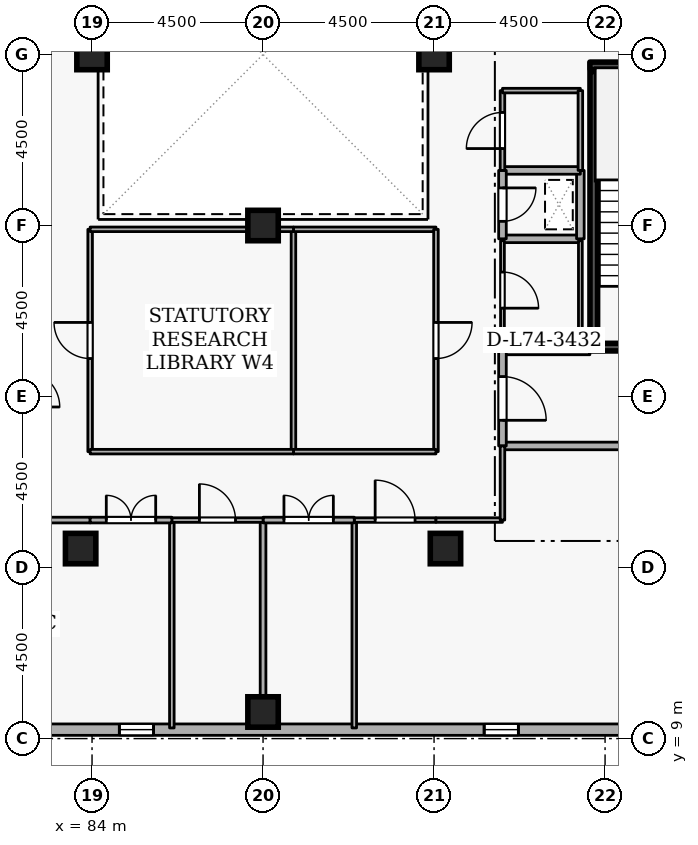
"""IFC4 building model, lengths in metres.
Left out: names, types, materials, properties, quantities, classifications, styles, units other than length and angle.
Written with IfcOpenShell. Run it as: python <this file> out.ifc"""

import sys

from ifc_helpers import new_model, si_unit, direction, frame, frame_2d, origin, origin_2d, place, context, subcontext, project, spatial, rectangle, extrude, element, fill, save


model = new_model("IFC4")
c1 = context("Model", 3, precision=1e-05, world=origin(), true_north=direction((0.0, 1.0)))
c2 = subcontext(c1, "Body", "Model", "MODEL_VIEW")
j1 = project(units=[si_unit("LENGTHUNIT", "METRE"), si_unit("PLANEANGLEUNIT", "RADIAN")], contexts=[c1])
p1 = place(None, origin())
s1 = spatial("IfcSite", under=j1, at=p1, CompositionType="ELEMENT")
p2 = place(p1, origin())
s2 = spatial("IfcBuilding", under=s1, at=p2, CompositionType="ELEMENT")
p3 = place(p2, frame((0.0, 0.0, 276.3)))
s3 = spatial("IfcBuildingStorey", under=s2, at=p3, CompositionType="ELEMENT", Elevation=276.3)
for number, where, z_axis, x_axis in (
    (1, (88.5, 9.7, 0.0), (0.0, 0.0, 1.0), (1.0, 0.0, 0.0)),
    (2, (93.3, 14.0, 0.0), (0.0, 0.0, 1.0), (1.0, 0.0, 0.0)),
    (3, (83.7, 14.0, 0.0), (0.0, 0.0, 1.0), (1.0, 0.0, 0.0)),
    (4, (93.0, 27.0, 0.0), (0.0, 0.0, 1.0), (1.0, 0.0, 0.0)),
    (5, (84.0, 27.0, 0.0), (0.0, 0.0, 1.0), (1.0, 0.0, 0.0)),
    (6, (88.5, 22.5, 0.0), (0.0, 0.0, 1.0), (1.0, 0.0, 0.0)),
):
    element("IfcColumn", number, at=place(p3, frame(where, z_axis=z_axis, x_axis=x_axis)), inside=s3, PredefinedType="COLUMN", context=c2, shape_type="SweptSolid", body=[
        extrude(rectangle(XDim=0.8, YDim=0.8, at=origin_2d()), origin(), (0.0, 0.0, 1.0), 3.6),
    ])
p4 = place(p3, frame((73.319, 9.235, 0.0), z_axis=(0.0, 0.0, 1.0), x_axis=(1.0, 0.0, 0.0)))
e7 = element("IfcWall", 7, at=p4, inside=s3, PredefinedType="STANDARD", context=c2, shape_type="SweptSolid", body=[
    extrude(rectangle(XDim=36.363, YDim=0.3, at=frame_2d((18.181, 0.0))), origin(), (0.0, 0.0, 1.0), 2.66),
])
p5 = place(p4, frame((6.6, 0.0, 0.72)))
e8 = element("IfcOpeningElement", 8, at=p5, cuts=e7, PredefinedType="OPENING", context=c2, shape_type="SweptSolid", body=[
    extrude(rectangle(XDim=0.9, YDim=1.75, at=frame_2d((0.45, 0.875))), frame((0.0, 0.16, 0.0), z_axis=(0.0, -1.0, 0.0), x_axis=(1.0, 0.0, 0.0)), (0.0, 0.0, 1.0), 0.32),
])
p6 = place(p4, frame((11.4, 0.0, 0.72)))
e9 = element("IfcOpeningElement", 9, at=p6, cuts=e7, PredefinedType="OPENING", context=c2, shape_type="SweptSolid", body=[
    extrude(rectangle(XDim=0.9, YDim=1.75, at=frame_2d((0.45, 0.875))), frame((0.0, 0.16, 0.0), z_axis=(0.0, -1.0, 0.0), x_axis=(1.0, 0.0, 0.0)), (0.0, 0.0, 1.0), 0.32),
])
p7 = place(p4, frame((21.0, 0.0, 0.72)))
e10 = element("IfcOpeningElement", 10, at=p7, cuts=e7, PredefinedType="OPENING", context=c2, shape_type="SweptSolid", body=[
    extrude(rectangle(XDim=0.9, YDim=1.75, at=frame_2d((0.45, 0.875))), frame((0.0, 0.16, 0.0), z_axis=(0.0, -1.0, 0.0), x_axis=(1.0, 0.0, 0.0)), (0.0, 0.0, 1.0), 0.32),
])
p8 = place(p4, frame((25.8, 0.0, 0.72)))
e11 = element("IfcOpeningElement", 11, at=p8, cuts=e7, PredefinedType="OPENING", context=c2, shape_type="SweptSolid", body=[
    extrude(rectangle(XDim=0.9, YDim=1.75, at=frame_2d((0.45, 0.875))), frame((0.0, 0.16, 0.0), z_axis=(0.0, -1.0, 0.0), x_axis=(1.0, 0.0, 0.0)), (0.0, 0.0, 1.0), 0.32),
])
p9 = place(p4, frame((30.6, 0.0, 0.72)))
e12 = element("IfcOpeningElement", 12, at=p9, cuts=e7, PredefinedType="OPENING", context=c2, shape_type="SweptSolid", body=[
    extrude(rectangle(XDim=0.9, YDim=1.75, at=frame_2d((0.45, 0.875))), frame((0.0, 0.16, 0.0), z_axis=(0.0, -1.0, 0.0), x_axis=(1.0, 0.0, 0.0)), (0.0, 0.0, 1.0), 0.32),
])
p10 = place(p3, frame((100.45, 19.3, 0.0), z_axis=(0.0, 0.0, 1.0), x_axis=(-1.0, 0.0, 0.0)))
e13 = element("IfcWall", 13, at=p10, inside=s3, PredefinedType="SHEAR", context=c2, shape_type="SweptSolid", body=[
    extrude(rectangle(XDim=3.35, YDim=0.2, at=frame_2d((1.675, 0.0))), origin(), (0.0, 0.0, 1.0), 3.6),
])
p11 = place(p10, frame((1.125, 0.0, 0.0)))
e14 = element("IfcOpeningElement", 14, at=p11, cuts=e13, PredefinedType="OPENING", context=c2, shape_type="SweptSolid", body=[
    extrude(rectangle(XDim=1.1, YDim=2.1, at=frame_2d((0.55, 1.05))), frame((0.0, 0.11, 0.0), z_axis=(0.0, -1.0, 0.0), x_axis=(1.0, 0.0, 0.0)), (0.0, 0.0, 1.0), 0.22),
])
p12 = place(p3, frame((97.1, 26.7, 0.0), z_axis=(0.0, 0.0, 1.0), x_axis=(1.0, 0.0, 0.0)))
e15 = element("IfcWall", 15, at=p12, inside=s3, PredefinedType="SHEAR", context=c2, shape_type="SweptSolid", body=[
    extrude(rectangle(XDim=3.35, YDim=0.2, at=frame_2d((1.675, 0.0))), origin(), (0.0, 0.0, 1.0), 3.6),
])
p13 = place(p3, frame((97.203, 26.55, 0.0), z_axis=(0.0, 0.0, 1.0), x_axis=(0.0, -1.0, 0.0)))
e16 = element("IfcWall", 16, at=p13, inside=s3, PredefinedType="SHEAR", context=c2, shape_type="SweptSolid", body=[
    extrude(rectangle(XDim=7.1, YDim=0.2, at=frame_2d((3.55, 0.0))), origin(), (0.0, 0.0, 1.0), 3.6),
])
p14 = place(p3, frame((94.8, 16.7, 0.0), z_axis=(0.0, 0.0, 1.0), x_axis=(1.0, 0.0, 0.0)))
e17 = element("IfcWall", 17, at=p14, inside=s3, PredefinedType="STANDARD", context=c2, shape_type="SweptSolid", body=[
    extrude(rectangle(XDim=5.7, YDim=0.2, at=frame_2d((2.85, 0.0))), origin(), (0.0, 0.0, 1.0), 3.26),
])
p15 = place(p3, frame((97.1, 19.2, 0.0), z_axis=(0.0, 0.0, 1.0), x_axis=(-1.0, 0.0, 0.0)))
e18 = element("IfcWall", 18, at=p15, inside=s3, PredefinedType="STANDARD", context=c2, shape_type="SweptSolid", body=[
    extrude(rectangle(XDim=2.3, YDim=0.2, at=frame_2d((1.15, 0.0))), origin(), (0.0, 0.0, 1.0), 2.465),
])
p16 = place(p3, frame((94.8, 19.2, 0.0), z_axis=(0.0, 0.0, 1.0), x_axis=(0.0, -1.0, 0.0)))
e19 = element("IfcWall", 19, at=p16, inside=s3, PredefinedType="STANDARD", context=c2, shape_type="SweptSolid", body=[
    extrude(rectangle(XDim=2.5, YDim=0.2, at=frame_2d((1.25, 0.0))), origin(), (0.0, 0.0, 1.0), 3.26),
])
p17 = place(p16, frame((0.675, 0.0, 0.0)))
e20 = element("IfcOpeningElement", 20, at=p17, cuts=e19, PredefinedType="OPENING", context=c2, shape_type="SweptSolid", body=[
    extrude(rectangle(XDim=1.15, YDim=2.1, at=frame_2d((0.575, 1.05))), frame((0.0, 0.11, 0.0), z_axis=(0.0, -1.0, 0.0), x_axis=(1.0, 0.0, 0.0)), (0.0, 0.0, 1.0), 0.22),
])
p18 = place(p3, frame((94.8, 22.15, 0.0), z_axis=(0.0, 0.0, 1.0), x_axis=(1.0, 0.0, 0.0)))
e21 = element("IfcWall", 21, at=p18, inside=s3, PredefinedType="STANDARD", context=c2, shape_type="SweptSolid", body=[
    extrude(rectangle(XDim=2.05, YDim=0.2, at=frame_2d((1.025, 0.0))), origin(), (0.0, 0.0, 1.0), 3.26),
])
p19 = place(p3, frame((96.85, 22.15, 0.0), z_axis=(0.0, 0.0, 1.0), x_axis=(0.0, 1.0, 0.0)))
e22 = element("IfcWall", 22, at=p19, inside=s3, PredefinedType="STANDARD", context=c2, shape_type="SweptSolid", body=[
    extrude(rectangle(XDim=1.8, YDim=0.2, at=frame_2d((0.9, 0.0))), origin(), (0.0, 0.0, 1.0), 3.26),
])
p20 = place(p3, frame((96.85, 23.95, 0.0), z_axis=(0.0, 0.0, 1.0), x_axis=(-1.0, 0.0, 0.0)))
e23 = element("IfcWall", 23, at=p20, inside=s3, PredefinedType="STANDARD", context=c2, shape_type="SweptSolid", body=[
    extrude(rectangle(XDim=2.05, YDim=0.2, at=frame_2d((1.025, 0.0))), origin(), (0.0, 0.0, 1.0), 3.26),
])
p21 = place(p3, frame((94.8, 23.95, 0.0), z_axis=(0.0, 0.0, 1.0), x_axis=(0.0, -1.0, 0.0)))
e24 = element("IfcWall", 24, at=p21, inside=s3, PredefinedType="STANDARD", context=c2, shape_type="SweptSolid", body=[
    extrude(rectangle(XDim=1.8, YDim=0.2, at=frame_2d((0.9, 0.0))), origin(), (0.0, 0.0, 1.0), 3.26),
])
p22 = place(p21, frame((0.46, 0.0, 0.0)))
e25 = element("IfcOpeningElement", 25, at=p22, cuts=e24, PredefinedType="OPENING", context=c2, shape_type="SweptSolid", body=[
    extrude(rectangle(XDim=0.88, YDim=2.04, at=frame_2d((0.44, 1.02))), frame((0.0, 0.11, 0.0), z_axis=(0.0, -1.0, 0.0), x_axis=(1.0, 0.0, 0.0)), (0.0, 0.0, 1.0), 0.22),
])
p23 = place(p3, frame((94.8, 19.5, 0.0), z_axis=(0.0, 0.0, 1.0), x_axis=(1.0, 0.0, 0.0)))
e26 = element("IfcWall", 26, at=p23, inside=s3, PredefinedType="PARTITIONING", context=c2, shape_type="SweptSolid", body=[
    extrude(rectangle(XDim=2.05, YDim=0.1, at=frame_2d((1.025, 0.0))), origin(), (0.0, 0.0, 1.0), 2.465),
])
p24 = place(p3, frame((96.85, 19.5, 0.0), z_axis=(0.0, 0.0, 1.0), x_axis=(0.0, 1.0, 0.0)))
e27 = element("IfcWall", 27, at=p24, inside=s3, PredefinedType="PARTITIONING", context=c2, shape_type="SweptSolid", body=[
    extrude(rectangle(XDim=2.6, YDim=0.1, at=frame_2d((1.3, 0.0))), origin(), (0.0, 0.0, 1.0), 3.26),
])
p25 = place(p3, frame((94.8, 22.1, 0.0), z_axis=(0.0, 0.0, 1.0), x_axis=(0.0, -1.0, 0.0)))
e28 = element("IfcWall", 28, at=p25, inside=s3, PredefinedType="PARTITIONING", context=c2, shape_type="SweptSolid", body=[
    extrude(rectangle(XDim=2.6, YDim=0.1, at=frame_2d((1.3, 0.0))), origin(), (0.0, 0.0, 1.0), 3.26),
])
p26 = place(p25, frame((0.825, 0.0, 0.0)))
e29 = element("IfcOpeningElement", 29, at=p26, cuts=e28, PredefinedType="OPENING", context=c2, shape_type="SweptSolid", body=[
    extrude(rectangle(XDim=0.95, YDim=2.1, at=frame_2d((0.475, 1.05))), frame((0.0, 0.06, 0.0), z_axis=(0.0, -1.0, 0.0), x_axis=(1.0, 0.0, 0.0)), (0.0, 0.0, 1.0), 0.12),
])
p27 = place(p3, frame((94.8, 23.95, 0.0), z_axis=(0.0, 0.0, 1.0), x_axis=(0.0, 1.0, 0.0)))
e30 = element("IfcWall", 30, at=p27, inside=s3, PredefinedType="PARTITIONING", context=c2, shape_type="SweptSolid", body=[
    extrude(rectangle(XDim=2.1, YDim=0.12, at=frame_2d((1.05, 0.0))), origin(), (0.0, 0.0, 1.0), 3.26),
])
p28 = place(p27, frame((0.575, 0.0, 0.0)))
e31 = element("IfcOpeningElement", 31, at=p28, cuts=e30, PredefinedType="OPENING", context=c2, shape_type="SweptSolid", body=[
    extrude(rectangle(XDim=0.95, YDim=2.1, at=frame_2d((0.475, 1.05))), frame((0.0, 0.07, 0.0), z_axis=(0.0, -1.0, 0.0), x_axis=(1.0, 0.0, 0.0)), (0.0, 0.0, 1.0), 0.14),
])
p29 = place(p3, frame((94.8, 26.05, 0.0), z_axis=(0.0, 0.0, 1.0), x_axis=(1.0, 0.0, 0.0)))
e32 = element("IfcWall", 32, at=p29, inside=s3, PredefinedType="PARTITIONING", context=c2, shape_type="SweptSolid", body=[
    extrude(rectangle(XDim=2.05, YDim=0.12, at=frame_2d((1.025, 0.0))), origin(), (0.0, 0.0, 1.0), 3.26),
])
p30 = place(p3, frame((96.85, 26.05, 0.0), z_axis=(0.0, 0.0, 1.0), x_axis=(0.0, -1.0, 0.0)))
e33 = element("IfcWall", 33, at=p30, inside=s3, PredefinedType="PARTITIONING", context=c2, shape_type="SweptSolid", body=[
    extrude(rectangle(XDim=2.1, YDim=0.12, at=frame_2d((1.05, 0.0))), origin(), (0.0, 0.0, 1.0), 3.26),
])
p31 = place(p3, frame((90.9, 9.28, 0.0), z_axis=(0.0, 0.0, 1.0), x_axis=(0.0, 1.0, 0.0)))
e34 = element("IfcWall", 34, at=p31, inside=s3, PredefinedType="PARTITIONING", context=c2, shape_type="SweptSolid", body=[
    extrude(rectangle(XDim=5.47, YDim=0.12, at=frame_2d((2.735, 0.0))), origin(), (0.0, 0.0, 1.0), 3.26),
])
p32 = place(p3, frame((90.9, 14.75, 0.0), z_axis=(0.0, 0.0, 1.0), x_axis=(1.0, 0.0, 0.0)))
e35 = element("IfcWall", 35, at=p32, inside=s3, PredefinedType="PARTITIONING", context=c2, shape_type="SweptSolid", body=[
    extrude(rectangle(XDim=2.15, YDim=0.12, at=frame_2d((1.075, 0.0))), origin(), (0.0, 0.0, 1.0), 3.26),
])
p33 = place(p32, frame((0.55, 0.0, 0.0)))
e36 = element("IfcOpeningElement", 36, at=p33, cuts=e35, PredefinedType="OPENING", context=c2, shape_type="SweptSolid", body=[
    extrude(rectangle(XDim=1.05, YDim=2.1, at=frame_2d((0.525, 1.05))), frame((0.0, 0.07, 0.0), z_axis=(0.0, -1.0, 0.0), x_axis=(1.0, 0.0, 0.0)), (0.0, 0.0, 1.0), 0.14),
])
p34 = place(p3, frame((93.05, 14.75, 0.0), z_axis=(0.0, 0.0, 1.0), x_axis=(1.0, 0.0, 0.0)))
e37 = element("IfcWall", 37, at=p34, inside=s3, PredefinedType="PARTITIONING", context=c2, shape_type="SweptSolid", body=[
    extrude(rectangle(XDim=1.75, YDim=0.12, at=frame_2d((0.875, 0.0))), origin(), (0.0, 0.0, 1.0), 3.26),
])
p35 = place(p3, frame((94.8, 14.75, 0.0), z_axis=(0.0, 0.0, 1.0), x_axis=(0.0, 1.0, 0.0)))
e38 = element("IfcWall", 38, at=p35, inside=s3, PredefinedType="PARTITIONING", context=c2, shape_type="SweptSolid", body=[
    extrude(rectangle(XDim=1.95, YDim=0.12, at=frame_2d((0.975, 0.0))), origin(), (0.0, 0.0, 1.0), 3.26),
])
p36 = place(p3, frame((88.5, 9.28, 0.0), z_axis=(0.0, 0.0, 1.0), x_axis=(0.0, 1.0, 0.0)))
e39 = element("IfcWall", 39, at=p36, inside=s3, PredefinedType="PARTITIONING", context=c2, shape_type="SweptSolid", body=[
    extrude(rectangle(XDim=5.47, YDim=0.15, at=frame_2d((2.735, 0.0))), origin(), (0.0, 0.0, 1.0), 2.802),
])
p37 = place(p3, frame((88.5, 14.75, 0.0), z_axis=(0.0, 0.0, 1.0), x_axis=(1.0, 0.0, 0.0)))
e40 = element("IfcWall", 40, at=p37, inside=s3, PredefinedType="PARTITIONING", context=c2, shape_type="SweptSolid", body=[
    extrude(rectangle(XDim=2.4, YDim=0.15, at=frame_2d((1.2, 0.0))), origin(), (0.0, 0.0, 1.0), 3.26),
])
p38 = place(p37, frame((0.55, 0.0, 0.0)))
e41 = element("IfcOpeningElement", 41, at=p38, cuts=e40, PredefinedType="OPENING", context=c2, shape_type="SweptSolid", body=[
    extrude(rectangle(XDim=1.3, YDim=2.12, at=frame_2d((0.65, 1.06))), frame((0.0, 0.085, 0.0), z_axis=(0.0, -1.0, 0.0), x_axis=(1.0, 0.0, 0.0)), (0.0, 0.0, 1.0), 0.17),
])
p39 = place(p3, frame((86.1, 9.28, 0.0), z_axis=(0.0, 0.0, 1.0), x_axis=(0.0, 1.0, 0.0)))
e42 = element("IfcWall", 42, at=p39, inside=s3, PredefinedType="PARTITIONING", context=c2, shape_type="SweptSolid", body=[
    extrude(rectangle(XDim=5.47, YDim=0.12, at=frame_2d((2.735, 0.0))), origin(), (0.0, 0.0, 1.0), 3.26),
])
p40 = place(p3, frame((86.1, 14.75, 0.0), z_axis=(0.0, 0.0, 1.0), x_axis=(1.0, 0.0, 0.0)))
e43 = element("IfcWall", 43, at=p40, inside=s3, PredefinedType="PARTITIONING", context=c2, shape_type="SweptSolid", body=[
    extrude(rectangle(XDim=2.4, YDim=0.12, at=frame_2d((1.2, 0.0))), origin(), (0.0, 0.0, 1.0), 3.26),
])
p41 = place(p40, frame((0.725, 0.0, 0.0)))
e44 = element("IfcOpeningElement", 44, at=p41, cuts=e43, PredefinedType="OPENING", context=c2, shape_type="SweptSolid", body=[
    extrude(rectangle(XDim=0.95, YDim=2.1, at=frame_2d((0.475, 1.05))), frame((0.0, 0.07, 0.0), z_axis=(0.0, -1.0, 0.0), x_axis=(1.0, 0.0, 0.0)), (0.0, 0.0, 1.0), 0.14),
])
p42 = place(p3, frame((82.2, 14.75, 0.0), z_axis=(0.0, 0.0, 1.0), x_axis=(1.0, 0.0, 0.0)))
e45 = element("IfcWall", 45, at=p42, inside=s3, PredefinedType="PARTITIONING", context=c2, shape_type="SweptSolid", body=[
    extrude(rectangle(XDim=1.75, YDim=0.15, at=frame_2d((0.875, 0.0))), origin(), (0.0, 0.0, 1.0), 3.26),
])
p43 = place(p3, frame((83.95, 14.75, 0.0), z_axis=(0.0, 0.0, 1.0), x_axis=(1.0, 0.0, 0.0)))
e46 = element("IfcWall", 46, at=p43, inside=s3, PredefinedType="PARTITIONING", context=c2, shape_type="SweptSolid", body=[
    extrude(rectangle(XDim=2.15, YDim=0.15, at=frame_2d((1.075, 0.0))), origin(), (0.0, 0.0, 1.0), 3.26),
])
p44 = place(p43, frame((0.425, 0.0, 0.0)))
e47 = element("IfcOpeningElement", 47, at=p44, cuts=e46, PredefinedType="OPENING", context=c2, shape_type="SweptSolid", body=[
    extrude(rectangle(XDim=1.3, YDim=2.12, at=frame_2d((0.65, 1.06))), frame((0.0, 0.085, 0.0), z_axis=(0.0, -1.0, 0.0), x_axis=(1.0, 0.0, 0.0)), (0.0, 0.0, 1.0), 0.17),
])
p45 = place(p3, frame((89.3, 16.55, 0.0), z_axis=(0.0, 0.0, 1.0), x_axis=(0.0, 1.0, 0.0)))
e48 = element("IfcWall", 48, at=p45, inside=s3, PredefinedType="PARTITIONING", context=c2, shape_type="SweptSolid", body=[
    extrude(rectangle(XDim=5.85, YDim=0.12, at=frame_2d((2.925, 0.0))), origin(), (0.0, 0.0, 1.0), 3.26),
])
p46 = place(p3, frame((89.3, 22.4, 0.0), z_axis=(0.0, 0.0, 1.0), x_axis=(1.0, 0.0, 0.0)))
e49 = element("IfcWall", 49, at=p46, inside=s3, PredefinedType="PARTITIONING", context=c2, shape_type="SweptSolid", body=[
    extrude(rectangle(XDim=3.75, YDim=0.12, at=frame_2d((1.875, 0.0))), origin(), (0.0, 0.0, 1.0), 3.26),
])
p47 = place(p3, frame((93.05, 22.4, 0.0), z_axis=(0.0, 0.0, 1.0), x_axis=(0.0, -1.0, 0.0)))
e50 = element("IfcWall", 50, at=p47, inside=s3, PredefinedType="PARTITIONING", context=c2, shape_type="SweptSolid", body=[
    extrude(rectangle(XDim=5.85, YDim=0.12, at=frame_2d((2.925, 0.0))), origin(), (0.0, 0.0, 1.0), 3.26),
])
p48 = place(p47, frame((2.45, 0.0, 0.0)))
e51 = element("IfcOpeningElement", 51, at=p48, cuts=e50, PredefinedType="OPENING", context=c2, shape_type="SweptSolid", body=[
    extrude(rectangle(XDim=0.95, YDim=2.1, at=frame_2d((0.475, 1.05))), frame((0.0, 0.07, 0.0), z_axis=(0.0, -1.0, 0.0), x_axis=(1.0, 0.0, 0.0)), (0.0, 0.0, 1.0), 0.14),
])
p49 = place(p3, frame((93.05, 16.55, 0.0), z_axis=(0.0, 0.0, 1.0), x_axis=(-1.0, 0.0, 0.0)))
e52 = element("IfcWall", 52, at=p49, inside=s3, PredefinedType="PARTITIONING", context=c2, shape_type="SweptSolid", body=[
    extrude(rectangle(XDim=3.75, YDim=0.12, at=frame_2d((1.875, 0.0))), origin(), (0.0, 0.0, 1.0), 3.26),
])
p50 = place(p3, frame((83.95, 16.55, 0.0), z_axis=(0.0, 0.0, 1.0), x_axis=(0.0, 1.0, 0.0)))
e53 = element("IfcWall", 53, at=p50, inside=s3, PredefinedType="PARTITIONING", context=c2, shape_type="SweptSolid", body=[
    extrude(rectangle(XDim=5.85, YDim=0.12, at=frame_2d((2.925, 0.0))), origin(), (0.0, 0.0, 1.0), 3.26),
])
p51 = place(p50, frame((2.45, 0.0, 0.0)))
e54 = element("IfcOpeningElement", 54, at=p51, cuts=e53, PredefinedType="OPENING", context=c2, shape_type="SweptSolid", body=[
    extrude(rectangle(XDim=0.95, YDim=2.1, at=frame_2d((0.475, 1.05))), frame((0.0, 0.07, 0.0), z_axis=(0.0, -1.0, 0.0), x_axis=(1.0, 0.0, 0.0)), (0.0, 0.0, 1.0), 0.14),
])
for number, where, z_axis, x_axis in (
    (55, (83.95, 22.4, 0.0), (0.0, 0.0, 1.0), (1.0, 0.0, 0.0)),
    (56, (89.3, 16.55, 0.0), (0.0, 0.0, 1.0), (-1.0, 0.0, 0.0)),
):
    element("IfcWall", number, at=place(p3, frame(where, z_axis=z_axis, x_axis=x_axis)), inside=s3, PredefinedType="PARTITIONING", context=c2, shape_type="SweptSolid", body=[
        extrude(rectangle(XDim=5.35, YDim=0.12, at=frame_2d((2.675, 0.0))), origin(), (0.0, 0.0, 1.0), 3.26),
    ])
p52 = place(p6, origin())
e57 = element("IfcWindow", 57, at=p52, inside=s3, PartitioningType="SINGLE_PANEL", PredefinedType="WINDOW", context=c2, shape_type="SweptSolid", body=[
    extrude(rectangle(XDim=0.9, YDim=1.75, at=frame_2d((0.45, 0.875))), frame((0.0, 0.03, 0.0), z_axis=(0.0, -1.0, 0.0), x_axis=(1.0, 0.0, 0.0)), (0.0, 0.0, 1.0), 0.06),
])
fill(e9, e57)
p53 = place(p7, origin())
e58 = element("IfcWindow", 58, at=p53, inside=s3, PartitioningType="SINGLE_PANEL", PredefinedType="WINDOW", context=c2, shape_type="SweptSolid", body=[
    extrude(rectangle(XDim=0.9, YDim=1.75, at=frame_2d((0.45, 0.875))), frame((0.0, 0.03, 0.0), z_axis=(0.0, -1.0, 0.0), x_axis=(1.0, 0.0, 0.0)), (0.0, 0.0, 1.0), 0.06),
])
fill(e10, e58)
p54 = place(p17, origin())
e59 = element("IfcDoor", 59, at=p54, inside=s3, OperationType="SINGLE_SWING_RIGHT", PredefinedType="DOOR", context=c2, shape_type="SweptSolid", body=[
    extrude(rectangle(XDim=1.15, YDim=2.1, at=frame_2d((0.575, 1.05))), frame((0.0, 0.025, 0.0), z_axis=(0.0, -1.0, 0.0), x_axis=(1.0, 0.0, 0.0)), (0.0, 0.0, 1.0), 0.05),
])
fill(e20, e59)
p55 = place(p22, origin())
e60 = element("IfcDoor", 60, at=p55, inside=s3, OperationType="SINGLE_SWING_LEFT", PredefinedType="DOOR", context=c2, shape_type="SweptSolid", body=[
    extrude(rectangle(XDim=0.88, YDim=2.04, at=frame_2d((0.44, 1.02))), frame((0.0, 0.025, 0.0), z_axis=(0.0, -1.0, 0.0), x_axis=(1.0, 0.0, 0.0)), (0.0, 0.0, 1.0), 0.05),
])
fill(e25, e60)
p56 = place(p26, origin())
e61 = element("IfcDoor", 61, at=p56, inside=s3, OperationType="SINGLE_SWING_RIGHT", PredefinedType="DOOR", context=c2, shape_type="SweptSolid", body=[
    extrude(rectangle(XDim=0.95, YDim=2.1, at=frame_2d((0.475, 1.05))), frame((0.0, 0.025, 0.0), z_axis=(0.0, -1.0, 0.0), x_axis=(1.0, 0.0, 0.0)), (0.0, 0.0, 1.0), 0.05),
])
fill(e29, e61)
p57 = place(p28, origin())
e62 = element("IfcDoor", 62, at=p57, inside=s3, OperationType="SINGLE_SWING_LEFT", PredefinedType="DOOR", context=c2, shape_type="SweptSolid", body=[
    extrude(rectangle(XDim=0.95, YDim=2.1, at=frame_2d((0.475, 1.05))), frame((0.0, 0.025, 0.0), z_axis=(0.0, -1.0, 0.0), x_axis=(1.0, 0.0, 0.0)), (0.0, 0.0, 1.0), 0.05),
])
fill(e31, e62)
p58 = place(p33, origin())
e63 = element("IfcDoor", 63, at=p58, inside=s3, OperationType="SINGLE_SWING_LEFT", PredefinedType="DOOR", context=c2, shape_type="SweptSolid", body=[
    extrude(rectangle(XDim=1.05, YDim=2.1, at=frame_2d((0.525, 1.05))), frame((0.0, 0.025, 0.0), z_axis=(0.0, -1.0, 0.0), x_axis=(1.0, 0.0, 0.0)), (0.0, 0.0, 1.0), 0.05),
])
fill(e36, e63)
p59 = place(p38, origin())
e64 = element("IfcDoor", 64, at=p59, inside=s3, OperationType="DOUBLE_DOOR_SINGLE_SWING", PredefinedType="DOOR", context=c2, shape_type="SweptSolid", body=[
    extrude(rectangle(XDim=1.3, YDim=2.12, at=frame_2d((0.65, 1.06))), frame((0.0, 0.025, 0.0), z_axis=(0.0, -1.0, 0.0), x_axis=(1.0, 0.0, 0.0)), (0.0, 0.0, 1.0), 0.05),
])
fill(e41, e64)
p60 = place(p41, origin())
e65 = element("IfcDoor", 65, at=p60, inside=s3, OperationType="SINGLE_SWING_LEFT", PredefinedType="DOOR", context=c2, shape_type="SweptSolid", body=[
    extrude(rectangle(XDim=0.95, YDim=2.1, at=frame_2d((0.475, 1.05))), frame((0.0, 0.025, 0.0), z_axis=(0.0, -1.0, 0.0), x_axis=(1.0, 0.0, 0.0)), (0.0, 0.0, 1.0), 0.05),
])
fill(e44, e65)
p61 = place(p44, origin())
e66 = element("IfcDoor", 66, at=p61, inside=s3, OperationType="DOUBLE_DOOR_SINGLE_SWING", PredefinedType="DOOR", context=c2, shape_type="SweptSolid", body=[
    extrude(rectangle(XDim=1.3, YDim=2.12, at=frame_2d((0.65, 1.06))), frame((0.0, 0.025, 0.0), z_axis=(0.0, -1.0, 0.0), x_axis=(1.0, 0.0, 0.0)), (0.0, 0.0, 1.0), 0.05),
])
fill(e47, e66)
p62 = place(p48, origin())
e67 = element("IfcDoor", 67, at=p62, inside=s3, OperationType="SINGLE_SWING_LEFT", PredefinedType="DOOR", context=c2, shape_type="SweptSolid", body=[
    extrude(rectangle(XDim=0.95, YDim=2.1, at=frame_2d((0.475, 1.05))), frame((0.0, 0.025, 0.0), z_axis=(0.0, -1.0, 0.0), x_axis=(1.0, 0.0, 0.0)), (0.0, 0.0, 1.0), 0.05),
])
fill(e51, e67)
p63 = place(p51, origin())
e68 = element("IfcDoor", 68, at=p63, inside=s3, OperationType="SINGLE_SWING_RIGHT", PredefinedType="DOOR", context=c2, shape_type="SweptSolid", body=[
    extrude(rectangle(XDim=0.95, YDim=2.1, at=frame_2d((0.475, 1.05))), frame((0.0, 0.025, 0.0), z_axis=(0.0, -1.0, 0.0), x_axis=(1.0, 0.0, 0.0)), (0.0, 0.0, 1.0), 0.05),
])
fill(e54, e68)
save(model, sys.argv[1])
